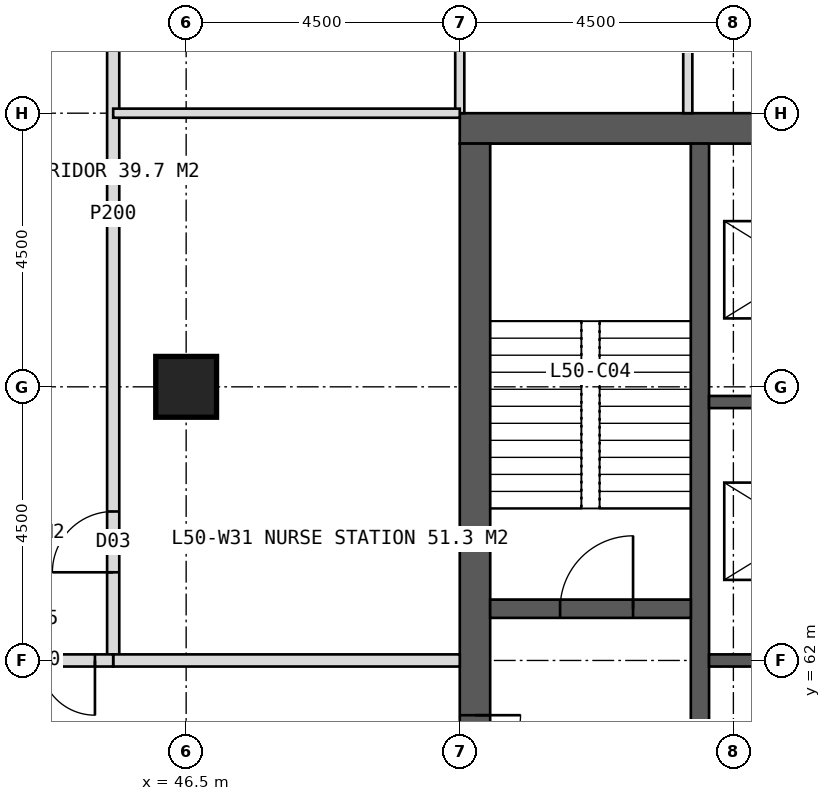
"""IFC4 building model, lengths in metres.
Left out: names, types, materials, properties, quantities, classifications, styles, units other than length and angle.
Written with IfcOpenShell. Run it as: python <this file> out.ifc"""

import sys

from ifc_helpers import new_model, si_unit, direction, frame, frame_2d, origin, origin_2d, place, context, subcontext, project, spatial, rectangle, hollow_rectangle, extrude, element, fill, save


model = new_model("IFC4")
c1 = context("Model", 3, precision=1e-05, world=origin(), true_north=direction((0.0, 1.0)))
c2 = subcontext(c1, "Body", "Model", "MODEL_VIEW")
j1 = project(units=[si_unit("LENGTHUNIT", "METRE"), si_unit("PLANEANGLEUNIT", "RADIAN")], contexts=[c1])
p1 = place(None, origin())
s1 = spatial("IfcSite", under=j1, at=p1, CompositionType="ELEMENT")
p2 = place(p1, origin())
s2 = spatial("IfcBuilding", under=s1, at=p2, CompositionType="ELEMENT")
p3 = place(p2, frame((0.0, 0.0, 209.0)))
s3 = spatial("IfcBuildingStorey", under=s2, at=p3, CompositionType="ELEMENT", Elevation=209.0)
p4 = place(p3, frame((51.0, 70.75, 0.0), z_axis=(0.0, 0.0, 1.0), x_axis=(1.0, 0.0, 0.0)))
e1 = element("IfcWall", 1, at=p4, inside=s3, PredefinedType="SHEAR", context=c2, shape_type="SweptSolid", body=[
    extrude(rectangle(XDim=18.0, YDim=0.5, at=frame_2d((9.0, 0.0))), origin(), (0.0, 0.0, 1.0), 4.0),
])
p5 = place(p4, frame((8.1, 0.0, 0.0)))
e2 = element("IfcOpeningElement", 2, at=p5, cuts=e1, PredefinedType="OPENING", context=c2, shape_type="SweptSolid", body=[
    extrude(rectangle(XDim=1.8, YDim=2.2, at=frame_2d((0.9, 1.1))), frame((0.0, 0.26, 0.0), z_axis=(0.0, -1.0, 0.0), x_axis=(1.0, 0.0, 0.0)), (0.0, 0.0, 1.0), 0.52),
])
p6 = place(p3, frame((51.25, 53.5, 0.0), z_axis=(0.0, 0.0, 1.0), x_axis=(0.0, 1.0, 0.0)))
e3 = element("IfcWall", 3, at=p6, inside=s3, PredefinedType="SHEAR", context=c2, shape_type="SweptSolid", body=[
    extrude(rectangle(XDim=17.0, YDim=0.5, at=frame_2d((8.5, 0.0))), origin(), (0.0, 0.0, 1.0), 4.0),
])
p7 = place(p6, frame((6.1, 0.0, 0.0)))
e4 = element("IfcOpeningElement", 4, at=p7, cuts=e3, PredefinedType="OPENING", context=c2, shape_type="SweptSolid", body=[
    extrude(rectangle(XDim=1.5, YDim=2.2, at=frame_2d((0.75, 1.1))), frame((0.0, 0.26, 0.0), z_axis=(0.0, -1.0, 0.0), x_axis=(1.0, 0.0, 0.0)), (0.0, 0.0, 1.0), 0.52),
])
p8 = place(p3, frame((54.95, 53.5, 0.0), z_axis=(0.0, 0.0, 1.0), x_axis=(0.0, 1.0, 0.0)))
e5 = element("IfcWall", 5, at=p8, inside=s3, PredefinedType="SHEAR", context=c2, shape_type="SweptSolid", body=[
    extrude(rectangle(XDim=17.0, YDim=0.3, at=frame_2d((8.5, 0.0))), origin(), (0.0, 0.0, 1.0), 4.0),
])
for number, where, z_axis, x_axis in (
    (6, (55.1, 62.0, 0.0), (0.0, 0.0, 1.0), (1.0, 0.0, 0.0)),
    (7, (55.1, 66.25, 0.0), (0.0, 0.0, 1.0), (1.0, 0.0, 0.0)),
):
    element("IfcWall", number, at=place(p3, frame(where, z_axis=z_axis, x_axis=x_axis)), inside=s3, PredefinedType="SHEAR", context=c2, shape_type="SweptSolid", body=[
        extrude(rectangle(XDim=3.05, YDim=0.2, at=frame_2d((1.525, 0.0))), origin(), (0.0, 0.0, 1.0), 4.0),
    ])
p9 = place(p3, frame((51.5, 62.85, 0.0), z_axis=(0.0, 0.0, 1.0), x_axis=(1.0, 0.0, 0.0)))
e8 = element("IfcWall", 8, at=p9, inside=s3, PredefinedType="SHEAR", context=c2, shape_type="SweptSolid", body=[
    extrude(rectangle(XDim=3.3, YDim=0.3, at=frame_2d((1.65, 0.0))), origin(), (0.0, 0.0, 1.0), 4.0),
])
p10 = place(p9, frame((1.15, 0.0, 0.0)))
e9 = element("IfcOpeningElement", 9, at=p10, cuts=e8, PredefinedType="OPENING", context=c2, shape_type="SweptSolid", body=[
    extrude(rectangle(XDim=1.2, YDim=2.1, at=frame_2d((0.6, 1.05))), frame((0.0, 0.16, 0.0), z_axis=(0.0, -1.0, 0.0), x_axis=(1.0, 0.0, 0.0)), (0.0, 0.0, 1.0), 0.32),
])
p11 = place(p3, frame((46.5, 66.5, 0.0), z_axis=(0.0, 0.0, 1.0), x_axis=(1.0, 0.0, 0.0)))
e10 = element("IfcColumn", 10, at=p11, inside=s3, PredefinedType="COLUMN", context=c2, shape_type="SweptSolid", body=[
    extrude(hollow_rectangle(XDim=1.0, YDim=1.0, WallThickness=0.1, at=origin_2d()), origin(), (0.0, 0.0, 1.0), 4.0),
])
p12 = place(p3, frame((51.0, 71.0, 0.0), z_axis=(0.0, 0.0, 1.0), x_axis=(0.0, 1.0, 0.0)))
e11 = element("IfcWall", 11, at=p12, inside=s3, PredefinedType="PARTITIONING", context=c2, shape_type="SweptSolid", body=[
    extrude(rectangle(XDim=5.7, YDim=0.15, at=frame_2d((2.85, 0.0))), origin(), (0.0, 0.0, 1.0), 3.75),
])
p13 = place(p3, frame((54.75, 71.0, 0.0), z_axis=(0.0, 0.0, 1.0), x_axis=(0.0, 1.0, 0.0)))
e12 = element("IfcWall", 12, at=p13, inside=s3, PredefinedType="PARTITIONING", context=c2, shape_type="SweptSolid", body=[
    extrude(rectangle(XDim=2.4, YDim=0.15, at=frame_2d((1.2, 0.0))), origin(), (0.0, 0.0, 1.0), 3.75),
])
p14 = place(p3, frame((45.3, 62.0, 0.0), z_axis=(0.0, 0.0, 1.0), x_axis=(0.0, 1.0, 0.0)))
e13 = element("IfcWall", 13, at=p14, inside=s3, PredefinedType="PARTITIONING", context=c2, shape_type="SweptSolid", body=[
    extrude(rectangle(XDim=14.7, YDim=0.2, at=frame_2d((7.35, 0.0))), origin(), (0.0, 0.0, 1.0), 3.75),
])
p15 = place(p14, frame((1.45, 0.0, 0.0)))
e14 = element("IfcOpeningElement", 14, at=p15, cuts=e13, PredefinedType="OPENING", context=c2, shape_type="SweptSolid", body=[
    extrude(rectangle(XDim=1.0, YDim=2.1, at=frame_2d((0.5, 1.05))), frame((0.0, 0.11, 0.0), z_axis=(0.0, -1.0, 0.0), x_axis=(1.0, 0.0, 0.0)), (0.0, 0.0, 1.0), 0.22),
])
p16 = place(p14, frame((11.35, 0.0, 0.0)))
e15 = element("IfcOpeningElement", 15, at=p16, cuts=e13, PredefinedType="OPENING", context=c2, shape_type="SweptSolid", body=[
    extrude(rectangle(XDim=1.0, YDim=2.1, at=frame_2d((0.5, 1.05))), frame((0.0, 0.11, 0.0), z_axis=(0.0, -1.0, 0.0), x_axis=(1.0, 0.0, 0.0)), (0.0, 0.0, 1.0), 0.22),
])
p17 = place(p3, frame((51.0, 62.0, 0.0), z_axis=(0.0, 0.0, 1.0), x_axis=(-1.0, 0.0, 0.0)))
e16 = element("IfcWall", 16, at=p17, inside=s3, PredefinedType="SOLIDWALL", context=c2, shape_type="SweptSolid", body=[
    extrude(rectangle(XDim=5.7, YDim=0.2, at=frame_2d((2.85, 0.0))), origin(), (0.0, 0.0, 1.0), 2.95),
])
p18 = place(p3, frame((51.0, 71.0, 0.0), z_axis=(0.0, 0.0, 1.0), x_axis=(-1.0, 0.0, 0.0)))
e17 = element("IfcWall", 17, at=p18, inside=s3, PredefinedType="PARTITIONING", context=c2, shape_type="SweptSolid", body=[
    extrude(rectangle(XDim=5.7, YDim=0.15, at=frame_2d((2.85, 0.0))), origin(), (0.0, 0.0, 1.0), 3.75),
])
p19 = place(p3, frame((45.3, 62.0, 0.0), z_axis=(0.0, 0.0, 1.0), x_axis=(-1.0, 0.0, 0.0)))
e18 = element("IfcWall", 18, at=p19, inside=s3, PredefinedType="SOLIDWALL", context=c2, shape_type="SweptSolid", body=[
    extrude(rectangle(XDim=2.7, YDim=0.2, at=frame_2d((1.35, 0.0))), origin(), (0.0, 0.0, 1.0), 2.95),
])
p20 = place(p19, frame((0.3, 0.0, 0.0)))
e19 = element("IfcOpeningElement", 19, at=p20, cuts=e18, PredefinedType="OPENING", context=c2, shape_type="SweptSolid", body=[
    extrude(rectangle(XDim=1.8, YDim=2.2, at=frame_2d((0.9, 1.1))), frame((0.0, 0.11, 0.0), z_axis=(0.0, -1.0, 0.0), x_axis=(1.0, 0.0, 0.0)), (0.0, 0.0, 1.0), 0.22),
])
p21 = place(p15, origin())
e20 = element("IfcDoor", 20, at=p21, inside=s3, OperationType="SINGLE_SWING_LEFT", PredefinedType="DOOR", context=c2, shape_type="SweptSolid", body=[
    extrude(rectangle(XDim=1.0, YDim=2.1, at=frame_2d((0.5, 1.05))), frame((0.0, 0.025, 0.0), z_axis=(0.0, -1.0, 0.0), x_axis=(1.0, 0.0, 0.0)), (0.0, 0.0, 1.0), 0.05),
])
fill(e14, e20)
p22 = place(p20, origin())
e21 = element("IfcDoor", 21, at=p22, inside=s3, OperationType="DOUBLE_DOOR_DOUBLE_SWING", PredefinedType="DOOR", context=c2, shape_type="SweptSolid", body=[
    extrude(rectangle(XDim=1.8, YDim=2.2, at=frame_2d((0.9, 1.1))), frame((0.0, 0.025, 0.0), z_axis=(0.0, -1.0, 0.0), x_axis=(1.0, 0.0, 0.0)), (0.0, 0.0, 1.0), 0.05),
])
fill(e19, e21)
p23 = place(p7, origin())
e22 = element("IfcDoor", 22, at=p23, inside=s3, OperationType="DOUBLE_DOOR_SINGLE_SWING", PredefinedType="DOOR", context=c2, shape_type="SweptSolid", body=[
    extrude(rectangle(XDim=1.5, YDim=2.2, at=frame_2d((0.75, 1.1))), frame((0.0, 0.025, 0.0), z_axis=(0.0, -1.0, 0.0), x_axis=(1.0, 0.0, 0.0)), (0.0, 0.0, 1.0), 0.05),
])
fill(e4, e22)
p24 = place(p10, origin())
e23 = element("IfcDoor", 23, at=p24, inside=s3, OperationType="SINGLE_SWING_RIGHT", PredefinedType="DOOR", context=c2, shape_type="SweptSolid", body=[
    extrude(rectangle(XDim=1.2, YDim=2.1, at=frame_2d((0.6, 1.05))), frame((0.0, 0.025, 0.0), z_axis=(0.0, -1.0, 0.0), x_axis=(1.0, 0.0, 0.0)), (0.0, 0.0, 1.0), 0.05),
])
fill(e9, e23)
save(model, sys.argv[1])
